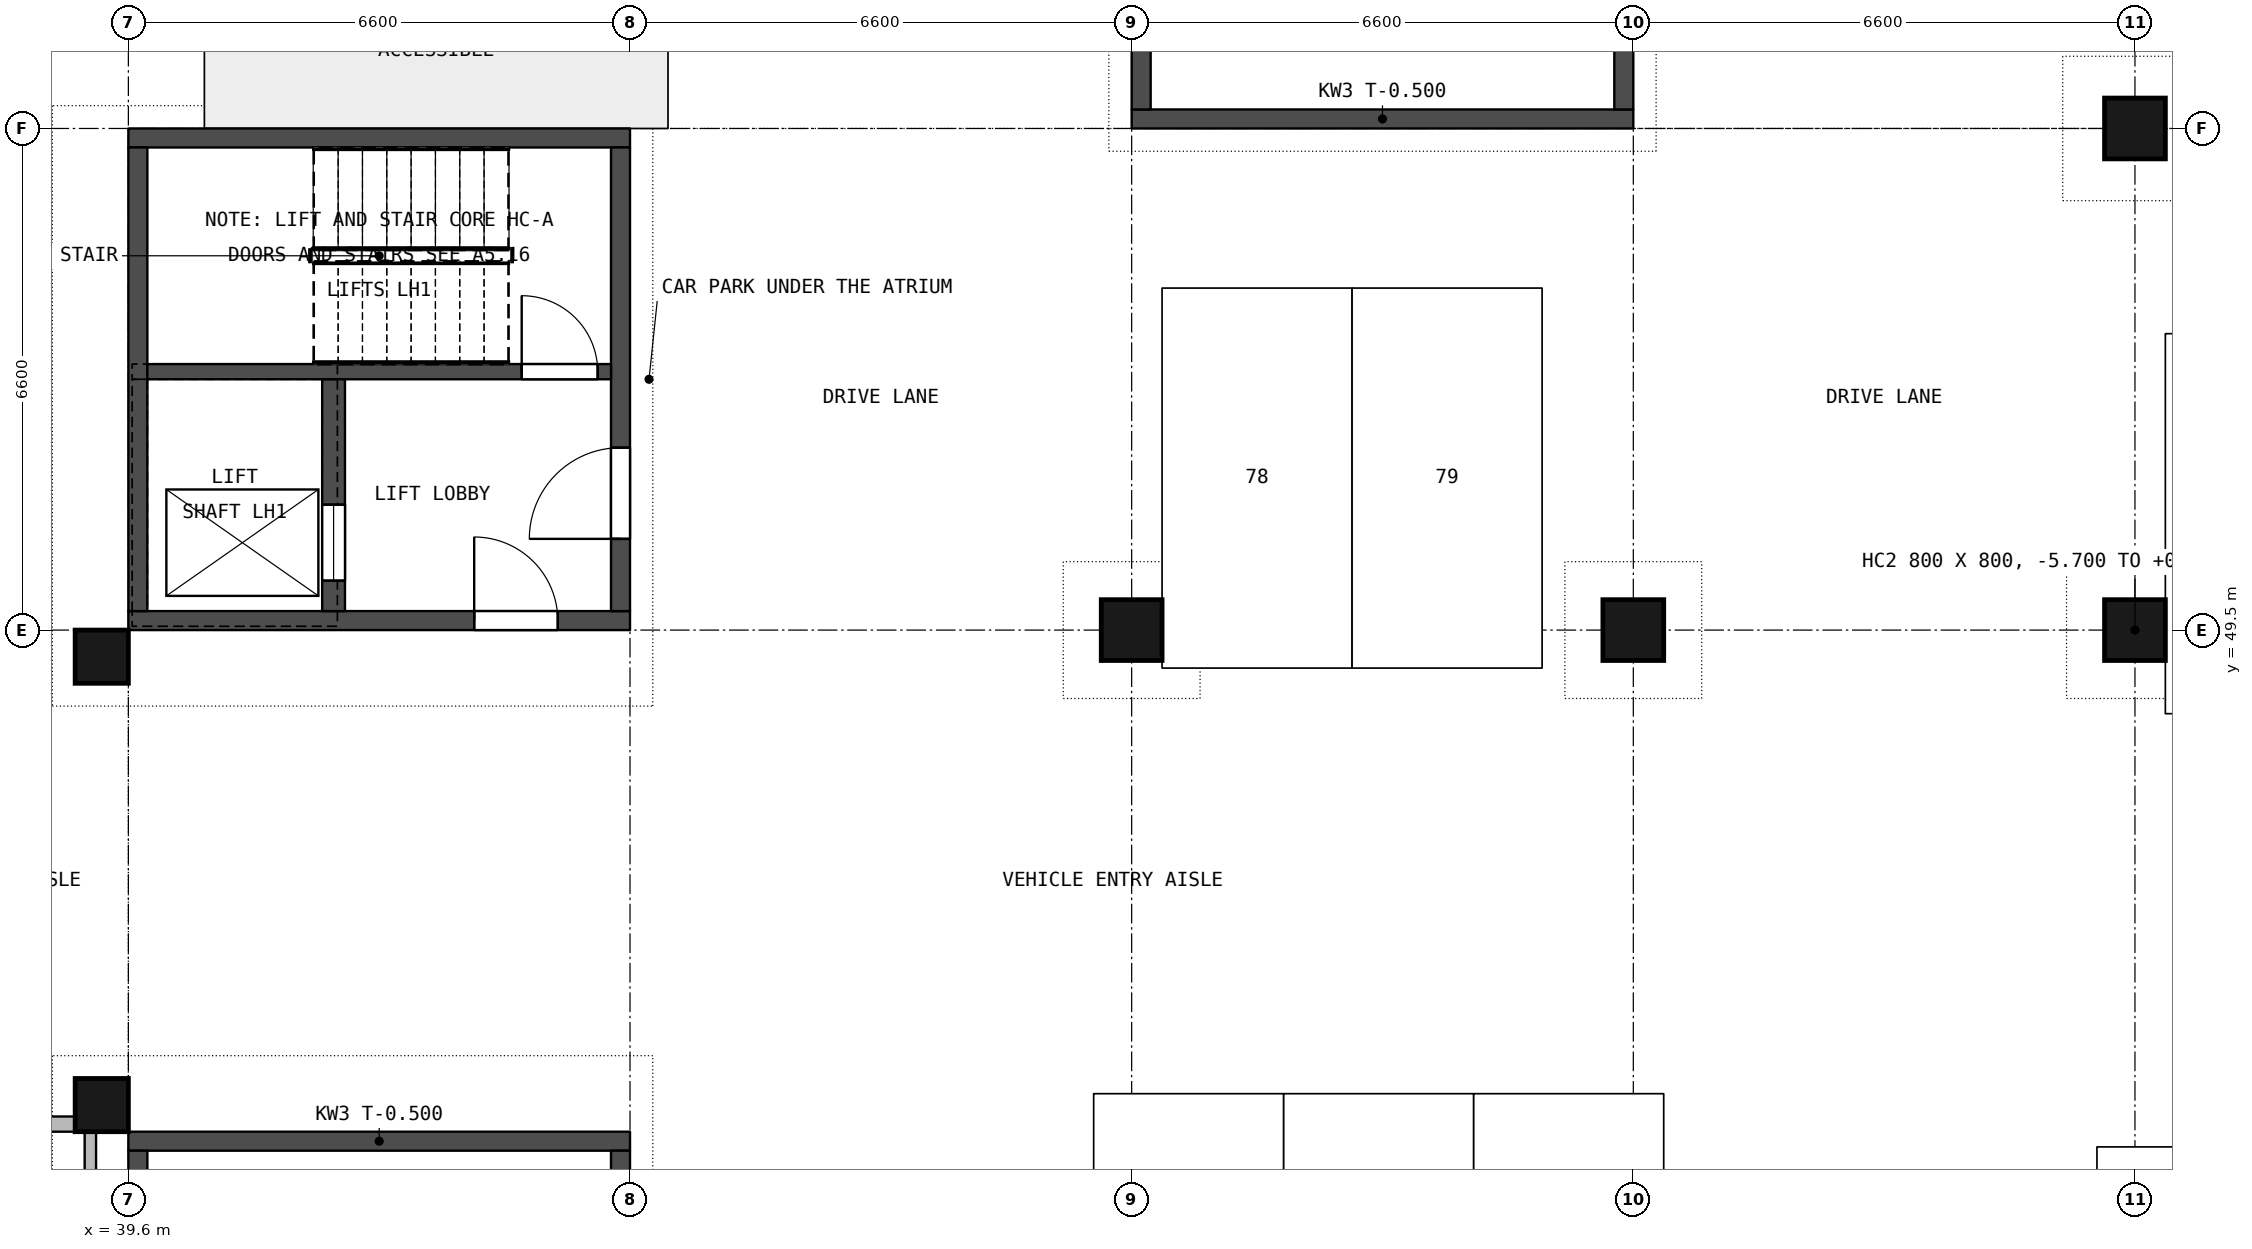
"""IFC4 building model, lengths in metres.
Left out: names, types, materials, properties, quantities, classifications, styles, units other than length and angle.
Written with IfcOpenShell. Run it as: python <this file> out.ifc"""

import sys

from ifc_helpers import new_model, si_unit, direction, frame, frame_2d, origin, origin_2d, place, context, subcontext, project, spatial, rectangle, extrude, element, fill, save


model = new_model("IFC4")
c1 = context("Model", 3, precision=1e-05, world=origin(), true_north=direction((0.0, 1.0)))
c2 = subcontext(c1, "Body", "Model", "MODEL_VIEW")
j1 = project(units=[si_unit("LENGTHUNIT", "METRE"), si_unit("PLANEANGLEUNIT", "RADIAN")], contexts=[c1])
p1 = place(None, origin())
s1 = spatial("IfcSite", under=j1, at=p1, CompositionType="ELEMENT")
p2 = place(p1, origin())
s2 = spatial("IfcBuilding", under=s1, at=p2, CompositionType="ELEMENT")
p3 = place(p2, frame((0.0, 0.0, -5.7)))
s3 = spatial("IfcBuildingStorey", under=s2, at=p3, CompositionType="ELEMENT", Elevation=-5.7)
p4 = place(p3, frame((66.0, 56.1, 0.0), z_axis=(0.0, 0.0, 1.0), x_axis=(1.0, 0.0, 0.0)))
e1 = element("IfcColumn", 1, at=p4, inside=s3, PredefinedType="COLUMN", context=c2, shape_type="SweptSolid", body=[
    extrude(rectangle(XDim=0.8, YDim=0.8, at=origin_2d()), origin(), (0.0, 0.0, 1.0), 5.7),
])
for number, where, z_axis, x_axis in (
    (2, (39.25, 43.25, 0.0), (0.0, 0.0, 1.0), (1.0, 0.0, 0.0)),
    (3, (39.25, 49.15, 0.0), (0.0, 0.0, 1.0), (1.0, 0.0, 0.0)),
):
    element("IfcColumn", number, at=place(p3, frame(where, z_axis=z_axis, x_axis=x_axis)), inside=s3, PredefinedType="COLUMN", context=c2, shape_type="SweptSolid", body=[
        extrude(rectangle(XDim=0.7, YDim=0.7, at=origin_2d()), origin(), (0.0, 0.0, 1.0), 5.7),
    ])
for number, where, z_axis, x_axis in (
    (4, (52.8, 49.5, 0.0), (0.0, 0.0, 1.0), (1.0, 0.0, 0.0)),
    (5, (59.4, 49.5, 0.0), (0.0, 0.0, 1.0), (1.0, 0.0, 0.0)),
    (6, (66.0, 49.5, 0.0), (0.0, 0.0, 1.0), (1.0, 0.0, 0.0)),
):
    element("IfcColumn", number, at=place(p3, frame(where, z_axis=z_axis, x_axis=x_axis)), inside=s3, PredefinedType="COLUMN", context=c2, shape_type="SweptSolid", body=[
        extrude(rectangle(XDim=0.8, YDim=0.8, at=origin_2d()), origin(), (0.0, 0.0, 1.0), 5.7),
    ])
p5 = place(p3, frame((39.6, 49.625, 0.0), z_axis=(0.0, 0.0, 1.0), x_axis=(1.0, 0.0, 0.0)))
e7 = element("IfcWall", 7, at=p5, inside=s3, PredefinedType="SHEAR", context=c2, shape_type="SweptSolid", body=[
    extrude(rectangle(XDim=6.6, YDim=0.25, at=frame_2d((3.3, 0.0))), origin(), (0.0, 0.0, 1.0), 5.2),
])
p6 = place(p5, frame((4.55, 0.0, 0.0)))
e8 = element("IfcOpeningElement", 8, at=p6, cuts=e7, PredefinedType="OPENING", context=c2, shape_type="SweptSolid", body=[
    extrude(rectangle(XDim=1.1, YDim=2.1, at=frame_2d((0.55, 1.05))), frame((0.0, 0.135, 0.0), z_axis=(0.0, -1.0, 0.0), x_axis=(1.0, 0.0, 0.0)), (0.0, 0.0, 1.0), 0.27),
])
p7 = place(p3, frame((39.6, 55.975, 0.0), z_axis=(0.0, 0.0, 1.0), x_axis=(1.0, 0.0, 0.0)))
e9 = element("IfcWall", 9, at=p7, inside=s3, PredefinedType="SHEAR", context=c2, shape_type="SweptSolid", body=[
    extrude(rectangle(XDim=6.6, YDim=0.25, at=frame_2d((3.3, 0.0))), origin(), (0.0, 0.0, 1.0), 5.2),
])
p8 = place(p3, frame((46.075, 49.75, 0.0), z_axis=(0.0, 0.0, 1.0), x_axis=(0.0, 1.0, 0.0)))
e10 = element("IfcWall", 10, at=p8, inside=s3, PredefinedType="SHEAR", context=c2, shape_type="SweptSolid", body=[
    extrude(rectangle(XDim=6.1, YDim=0.25, at=frame_2d((3.05, 0.0))), origin(), (0.0, 0.0, 1.0), 5.2),
])
p9 = place(p8, frame((0.95, 0.0, 0.0)))
e11 = element("IfcOpeningElement", 11, at=p9, cuts=e10, PredefinedType="OPENING", context=c2, shape_type="SweptSolid", body=[
    extrude(rectangle(XDim=1.2, YDim=2.4, at=frame_2d((0.6, 1.2))), frame((0.0, 0.135, 0.0), z_axis=(0.0, -1.0, 0.0), x_axis=(1.0, 0.0, 0.0)), (0.0, 0.0, 1.0), 0.27),
])
p10 = place(p3, frame((39.725, 49.75, 0.0), z_axis=(0.0, 0.0, 1.0), x_axis=(0.0, 1.0, 0.0)))
e12 = element("IfcWall", 12, at=p10, inside=s3, PredefinedType="SHEAR", context=c2, shape_type="SweptSolid", body=[
    extrude(rectangle(XDim=6.1, YDim=0.25, at=frame_2d((3.05, 0.0))), origin(), (0.0, 0.0, 1.0), 5.2),
])
p11 = place(p3, frame((39.85, 52.9, 0.0), z_axis=(0.0, 0.0, 1.0), x_axis=(1.0, 0.0, 0.0)))
e13 = element("IfcWall", 13, at=p11, inside=s3, PredefinedType="SHEAR", context=c2, shape_type="SweptSolid", body=[
    extrude(rectangle(XDim=6.1, YDim=0.2, at=frame_2d((3.05, 0.0))), origin(), (0.0, 0.0, 1.0), 5.2),
])
p12 = place(p11, frame((4.925, 0.0, 0.0)))
e14 = element("IfcOpeningElement", 14, at=p12, cuts=e13, PredefinedType="OPENING", context=c2, shape_type="SweptSolid", body=[
    extrude(rectangle(XDim=1.0, YDim=2.1, at=frame_2d((0.5, 1.05))), frame((0.0, 0.11, 0.0), z_axis=(0.0, -1.0, 0.0), x_axis=(1.0, 0.0, 0.0)), (0.0, 0.0, 1.0), 0.22),
])
p13 = place(p3, frame((42.3, 49.75, 0.0), z_axis=(0.0, 0.0, 1.0), x_axis=(0.0, 1.0, 0.0)))
e15 = element("IfcWall", 15, at=p13, inside=s3, PredefinedType="SHEAR", context=c2, shape_type="SweptSolid", body=[
    extrude(rectangle(XDim=3.05, YDim=0.3, at=frame_2d((1.525, 0.0))), origin(), (0.0, 0.0, 1.0), 5.2),
])
p14 = place(p13, frame((0.4, 0.0, 0.0)))
e16 = element("IfcOpeningElement", 16, at=p14, cuts=e15, PredefinedType="OPENING", context=c2, shape_type="SweptSolid", body=[
    extrude(rectangle(XDim=1.0, YDim=2.1, at=frame_2d((0.5, 1.05))), frame((0.0, 0.16, 0.0), z_axis=(0.0, -1.0, 0.0), x_axis=(1.0, 0.0, 0.0)), (0.0, 0.0, 1.0), 0.32),
])
for number, where, z_axis, x_axis in (
    (17, (39.65, 49.65, -1.2), (0.0, 0.0, 1.0), (1.0, 0.0, 0.0)),
    (18, (39.65, 52.9, -1.2), (0.0, 0.0, 1.0), (1.0, 0.0, 0.0)),
):
    element("IfcWall", number, at=place(p3, frame(where, z_axis=z_axis, x_axis=x_axis)), inside=s3, PredefinedType="SHEAR", context=c2, shape_type="SweptSolid", body=[
        extrude(rectangle(XDim=2.7, YDim=0.2, at=frame_2d((1.35, 0.0))), origin(), (0.0, 0.0, 1.0), 0.6),
    ])
for number, where, z_axis, x_axis in (
    (19, (39.75, 49.75, -1.2), (0.0, 0.0, 1.0), (0.0, 1.0, 0.0)),
    (20, (42.25, 49.75, -1.2), (0.0, 0.0, 1.0), (0.0, 1.0, 0.0)),
):
    element("IfcWall", number, at=place(p3, frame(where, z_axis=z_axis, x_axis=x_axis)), inside=s3, PredefinedType="SHEAR", context=c2, shape_type="SweptSolid", body=[
        extrude(rectangle(XDim=3.05, YDim=0.2, at=frame_2d((1.525, 0.0))), origin(), (0.0, 0.0, 1.0), 0.6),
    ])
p15 = place(p3, frame((39.6, 42.775, 0.0), z_axis=(0.0, 0.0, 1.0), x_axis=(1.0, 0.0, 0.0)))
e21 = element("IfcWall", 21, at=p15, inside=s3, PredefinedType="SHEAR", context=c2, shape_type="SweptSolid", body=[
    extrude(rectangle(XDim=6.6, YDim=0.25, at=frame_2d((3.3, 0.0))), origin(), (0.0, 0.0, 1.0), 5.2),
])
for number, where, z_axis, x_axis in (
    (22, (39.725, 36.55, 0.0), (0.0, 0.0, 1.0), (0.0, 1.0, 0.0)),
    (23, (46.075, 36.55, 0.0), (0.0, 0.0, 1.0), (0.0, 1.0, 0.0)),
):
    element("IfcWall", number, at=place(p3, frame(where, z_axis=z_axis, x_axis=x_axis)), inside=s3, PredefinedType="SHEAR", context=c2, shape_type="SweptSolid", body=[
        extrude(rectangle(XDim=6.1, YDim=0.25, at=frame_2d((3.05, 0.0))), origin(), (0.0, 0.0, 1.0), 5.2),
    ])
p16 = place(p3, frame((52.8, 56.225, 0.0), z_axis=(0.0, 0.0, 1.0), x_axis=(1.0, 0.0, 0.0)))
e24 = element("IfcWall", 24, at=p16, inside=s3, PredefinedType="SHEAR", context=c2, shape_type="SweptSolid", body=[
    extrude(rectangle(XDim=6.6, YDim=0.25, at=frame_2d((3.3, 0.0))), origin(), (0.0, 0.0, 1.0), 5.2),
])
for number, where, z_axis, x_axis in (
    (25, (52.925, 56.35, 0.0), (0.0, 0.0, 1.0), (0.0, 1.0, 0.0)),
    (26, (59.275, 56.35, 0.0), (0.0, 0.0, 1.0), (0.0, 1.0, 0.0)),
):
    element("IfcWall", number, at=place(p3, frame(where, z_axis=z_axis, x_axis=x_axis)), inside=s3, PredefinedType="SHEAR", context=c2, shape_type="SweptSolid", body=[
        extrude(rectangle(XDim=6.1, YDim=0.25, at=frame_2d((3.05, 0.0))), origin(), (0.0, 0.0, 1.0), 5.2),
    ])
p17 = place(p3, frame((10.4, 43.0, 0.0), z_axis=(0.0, 0.0, 1.0), x_axis=(1.0, 0.0, 0.0)))
e27 = element("IfcWall", 27, at=p17, inside=s3, PredefinedType="PARTITIONING", context=c2, shape_type="SweptSolid", body=[
    extrude(rectangle(XDim=28.5, YDim=0.2, at=frame_2d((14.25, 0.0))), origin(), (0.0, 0.0, 1.0), 5.25),
])
p18 = place(p17, frame((3.1, 0.0, 0.0)))
e28 = element("IfcOpeningElement", 28, at=p18, cuts=e27, PredefinedType="OPENING", context=c2, shape_type="SweptSolid", body=[
    extrude(rectangle(XDim=1.2, YDim=2.1, at=frame_2d((0.6, 1.05))), frame((0.0, 0.11, 0.0), z_axis=(0.0, -1.0, 0.0), x_axis=(1.0, 0.0, 0.0)), (0.0, 0.0, 1.0), 0.22),
])
p19 = place(p17, frame((7.75, 0.0, 0.0)))
e29 = element("IfcOpeningElement", 29, at=p19, cuts=e27, PredefinedType="OPENING", context=c2, shape_type="SweptSolid", body=[
    extrude(rectangle(XDim=1.2, YDim=2.1, at=frame_2d((0.6, 1.05))), frame((0.0, 0.11, 0.0), z_axis=(0.0, -1.0, 0.0), x_axis=(1.0, 0.0, 0.0)), (0.0, 0.0, 1.0), 0.22),
])
p20 = place(p17, frame((12.65, 0.0, 0.0)))
e30 = element("IfcOpeningElement", 30, at=p20, cuts=e27, PredefinedType="OPENING", context=c2, shape_type="SweptSolid", body=[
    extrude(rectangle(XDim=2.4, YDim=2.4, at=frame_2d((1.2, 1.2))), frame((0.0, 0.11, 0.0), z_axis=(0.0, -1.0, 0.0), x_axis=(1.0, 0.0, 0.0)), (0.0, 0.0, 1.0), 0.22),
])
p21 = place(p17, frame((18.2, 0.0, 0.0)))
e31 = element("IfcOpeningElement", 31, at=p21, cuts=e27, PredefinedType="OPENING", context=c2, shape_type="SweptSolid", body=[
    extrude(rectangle(XDim=1.8, YDim=2.4, at=frame_2d((0.9, 1.2))), frame((0.0, 0.11, 0.0), z_axis=(0.0, -1.0, 0.0), x_axis=(1.0, 0.0, 0.0)), (0.0, 0.0, 1.0), 0.22),
])
p22 = place(p17, frame((23.1, 0.0, 0.0)))
e32 = element("IfcOpeningElement", 32, at=p22, cuts=e27, PredefinedType="OPENING", context=c2, shape_type="SweptSolid", body=[
    extrude(rectangle(XDim=1.0, YDim=2.1, at=frame_2d((0.5, 1.05))), frame((0.0, 0.11, 0.0), z_axis=(0.0, -1.0, 0.0), x_axis=(1.0, 0.0, 0.0)), (0.0, 0.0, 1.0), 0.22),
])
p23 = place(p17, frame((26.55, 0.0, 0.0)))
e33 = element("IfcOpeningElement", 33, at=p23, cuts=e27, PredefinedType="OPENING", context=c2, shape_type="SweptSolid", body=[
    extrude(rectangle(XDim=1.0, YDim=2.1, at=frame_2d((0.5, 1.05))), frame((0.0, 0.11, 0.0), z_axis=(0.0, -1.0, 0.0), x_axis=(1.0, 0.0, 0.0)), (0.0, 0.0, 1.0), 0.22),
])
p24 = place(p3, frame((39.1, 36.3, 0.0), z_axis=(0.0, 0.0, 1.0), x_axis=(0.0, 1.0, 0.0)))
e34 = element("IfcWall", 34, at=p24, inside=s3, PredefinedType="PARTITIONING", context=c2, shape_type="SweptSolid", body=[
    extrude(rectangle(XDim=6.6, YDim=0.15, at=frame_2d((3.3, 0.0))), origin(), (0.0, 0.0, 1.0), 5.25),
])
p25 = place(p6, origin())
e35 = element("IfcDoor", 35, at=p25, inside=s3, OperationType="SINGLE_SWING_LEFT", PredefinedType="DOOR", context=c2, shape_type="SweptSolid", body=[
    extrude(rectangle(XDim=1.1, YDim=2.1, at=frame_2d((0.55, 1.05))), frame((0.0, 0.025, 0.0), z_axis=(0.0, -1.0, 0.0), x_axis=(1.0, 0.0, 0.0)), (0.0, 0.0, 1.0), 0.05),
])
fill(e8, e35)
p26 = place(p12, origin())
e36 = element("IfcDoor", 36, at=p26, inside=s3, OperationType="SINGLE_SWING_LEFT", PredefinedType="DOOR", context=c2, shape_type="SweptSolid", body=[
    extrude(rectangle(XDim=1.0, YDim=2.1, at=frame_2d((0.5, 1.05))), frame((0.0, 0.025, 0.0), z_axis=(0.0, -1.0, 0.0), x_axis=(1.0, 0.0, 0.0)), (0.0, 0.0, 1.0), 0.05),
])
fill(e14, e36)
p27 = place(p9, origin())
e37 = element("IfcDoor", 37, at=p27, inside=s3, OperationType="SINGLE_SWING_LEFT", PredefinedType="DOOR", context=c2, shape_type="SweptSolid", body=[
    extrude(rectangle(XDim=1.2, YDim=2.4, at=frame_2d((0.6, 1.2))), frame((0.0, 0.025, 0.0), z_axis=(0.0, -1.0, 0.0), x_axis=(1.0, 0.0, 0.0)), (0.0, 0.0, 1.0), 0.05),
])
fill(e11, e37)
p28 = place(p14, origin())
e38 = element("IfcDoor", 38, at=p28, inside=s3, OperationType="DOUBLE_DOOR_SLIDING", PredefinedType="NOTDEFINED", context=c2, shape_type="SweptSolid", body=[
    extrude(rectangle(XDim=1.0, YDim=2.1, at=frame_2d((0.5, 1.05))), frame((0.0, 0.025, 0.0), z_axis=(0.0, -1.0, 0.0), x_axis=(1.0, 0.0, 0.0)), (0.0, 0.0, 1.0), 0.05),
])
fill(e16, e38)
save(model, sys.argv[1])
